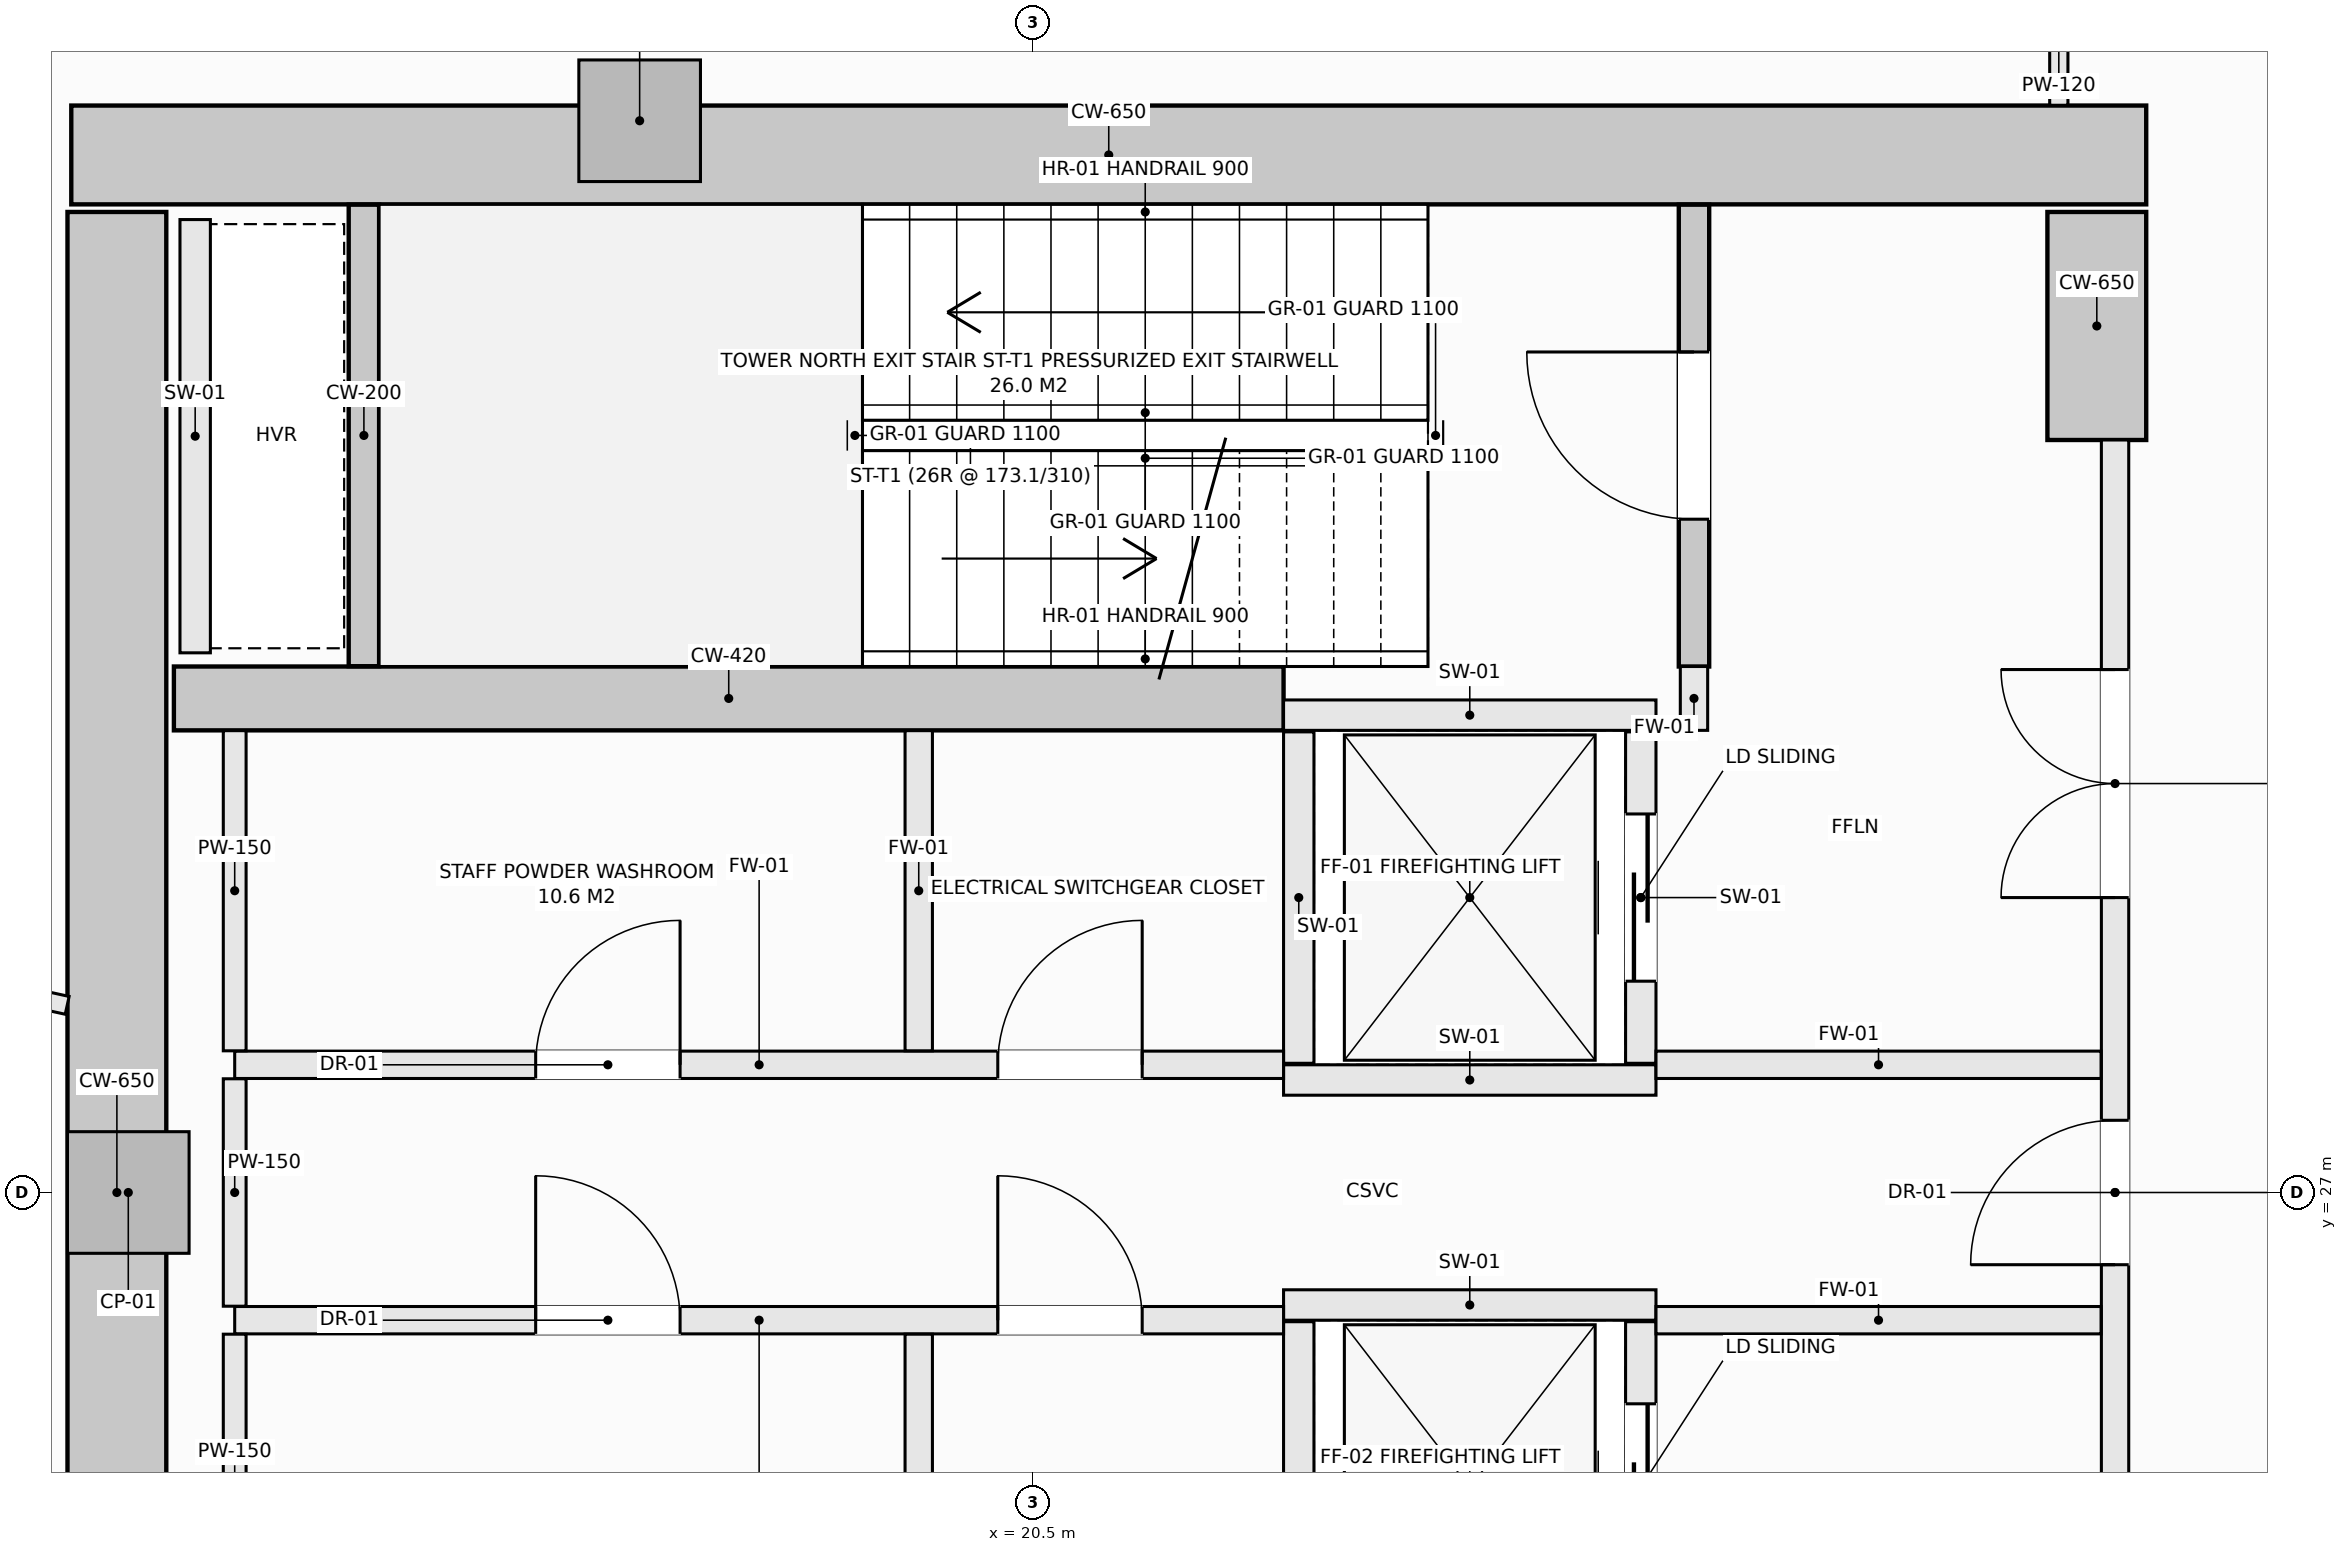
"""IFC4 building model, lengths in metres.
Left out: names, types, materials, properties, quantities, classifications, styles, units other than length and angle.
Written with IfcOpenShell. Run it as: python <this file> out.ifc"""

import sys

from ifc_helpers import new_model, si_unit, direction, frame, frame_2d, origin, origin_2d, place, context, subcontext, project, spatial, rectangle, extrude, element, fill, save


model = new_model("IFC4")
c1 = context("Model", 3, precision=1e-05, world=origin(), true_north=direction((0.0, 1.0)))
c2 = subcontext(c1, "Body", "Model", "MODEL_VIEW")
j1 = project(units=[si_unit("LENGTHUNIT", "METRE"), si_unit("PLANEANGLEUNIT", "RADIAN")], contexts=[c1])
p1 = place(None, origin())
s1 = spatial("IfcSite", under=j1, at=p1, CompositionType="ELEMENT")
p2 = place(p1, origin())
s2 = spatial("IfcBuilding", under=s1, at=p2, CompositionType="ELEMENT")
p3 = place(p2, frame((0.0, 0.0, 100.8)))
s3 = spatial("IfcBuildingStorey", under=s2, at=p3, CompositionType="ELEMENT", Elevation=100.8)
p4 = place(p3, frame((14.175, 33.825, -0.28), z_axis=(0.0, 0.0, 1.0), x_axis=(1.0, 0.0, 0.0)))
e1 = element("IfcWall", 1, at=p4, inside=s3, PredefinedType="SHEAR", context=c2, shape_type="SweptSolid", body=[
    extrude(rectangle(XDim=13.65, YDim=0.65, at=frame_2d((6.825, 0.0))), origin(), (0.0, 0.0, 1.0), 4.51),
])
p5 = place(p3, frame((14.475, 20.55, -0.28), z_axis=(0.0, 0.0, 1.0), x_axis=(0.0, 1.0, 0.0)))
e2 = element("IfcWall", 2, at=p5, inside=s3, PredefinedType="SHEAR", context=c2, shape_type="SweptSolid", body=[
    extrude(rectangle(XDim=12.9, YDim=0.65, at=frame_2d((6.45, 0.0))), origin(), (0.0, 0.0, 1.0), 4.51),
])
p6 = place(p3, frame((27.5, 31.95, -0.28), z_axis=(0.0, 0.0, 1.0), x_axis=(0.0, 1.0, 0.0)))
e3 = element("IfcWall", 3, at=p6, inside=s3, PredefinedType="SHEAR", context=c2, shape_type="SweptSolid", body=[
    extrude(rectangle(XDim=1.5, YDim=0.65, at=frame_2d((0.75, 0.0))), origin(), (0.0, 0.0, 1.0), 4.51),
])
p7 = place(p3, frame((14.85, 30.25, -0.28), z_axis=(0.0, 0.0, 1.0), x_axis=(1.0, 0.0, 0.0)))
e4 = element("IfcWall", 4, at=p7, inside=s3, PredefinedType="SHEAR", context=c2, shape_type="SweptSolid", body=[
    extrude(rectangle(XDim=7.3, YDim=0.42, at=frame_2d((3.65, 0.0))), origin(), (0.0, 0.0, 1.0), 4.51),
])
for number, where, z_axis, x_axis in (
    (5, (17.914, 34.05, -0.28), (0.0, 0.0, 1.0), (1.0, 0.0, 0.0)),
    (6, (14.55, 27.0, -0.28), (0.0, 0.0, 1.0), (1.0, 0.0, 0.0)),
):
    element("IfcColumn", number, at=place(p3, frame(where, z_axis=z_axis, x_axis=x_axis)), inside=s3, PredefinedType="PILASTER", context=c2, shape_type="SweptSolid", body=[
        extrude(rectangle(XDim=0.8, YDim=0.8, at=origin_2d()), origin(), (0.0, 0.0, 1.0), 4.51),
    ])
p8 = place(p3, frame((24.85, 30.46, -0.28), z_axis=(0.0, 0.0, 1.0), x_axis=(0.0, 1.0, 0.0)))
e7 = element("IfcWall", 7, at=p8, inside=s3, PredefinedType="SHEAR", context=c2, shape_type="SweptSolid", body=[
    extrude(rectangle(XDim=3.038, YDim=0.2, at=frame_2d((1.519, 0.0))), origin(), (0.0, 0.0, 1.0), 4.51),
])
p9 = place(p8, frame((0.969, 0.0, 0.28)))
e8 = element("IfcOpeningElement", 8, at=p9, cuts=e7, PredefinedType="OPENING", context=c2, shape_type="SweptSolid", body=[
    extrude(rectangle(XDim=1.1, YDim=2.15, at=frame_2d((0.55, 1.075))), frame((0.0, 0.11, 0.0), z_axis=(0.0, -1.0, 0.0), x_axis=(1.0, 0.0, 0.0)), (0.0, 0.0, 1.0), 0.22),
])
p10 = place(p3, frame((16.1, 30.462, -0.28), z_axis=(0.0, 0.0, 1.0), x_axis=(0.0, 1.0, 0.0)))
e9 = element("IfcWall", 9, at=p10, inside=s3, PredefinedType="SHEAR", context=c2, shape_type="SweptSolid", body=[
    extrude(rectangle(XDim=3.036, YDim=0.2, at=frame_2d((1.518, 0.0))), origin(), (0.0, 0.0, 1.0), 4.51),
])
for number, where, z_axis, x_axis in (
    (10, (22.15, 30.14, 0.0), (0.0, 0.0, 1.0), (1.0, 0.0, 0.0)),
    (11, (22.15, 27.74, 0.0), (0.0, 0.0, 1.0), (1.0, 0.0, 0.0)),
):
    element("IfcWall", number, at=place(p3, frame(where, z_axis=z_axis, x_axis=x_axis)), inside=s3, PredefinedType="SOLIDWALL", context=c2, shape_type="SweptSolid", body=[
        extrude(rectangle(XDim=2.45, YDim=0.2, at=frame_2d((1.225, 0.0))), origin(), (0.0, 0.0, 1.0), 4.23),
    ])
p11 = place(p3, frame((22.25, 27.85, 0.0), z_axis=(0.0, 0.0, 1.0), x_axis=(0.0, 1.0, 0.0)))
e12 = element("IfcWall", 12, at=p11, inside=s3, PredefinedType="SOLIDWALL", context=c2, shape_type="SweptSolid", body=[
    extrude(rectangle(XDim=2.18, YDim=0.2, at=frame_2d((1.09, 0.0))), origin(), (0.0, 0.0, 1.0), 4.23),
])
p12 = place(p3, frame((24.5, 27.85, 0.0), z_axis=(0.0, 0.0, 1.0), x_axis=(0.0, 1.0, 0.0)))
e13 = element("IfcWall", 13, at=p12, inside=s3, PredefinedType="SOLIDWALL", context=c2, shape_type="SweptSolid", body=[
    extrude(rectangle(XDim=2.18, YDim=0.2, at=frame_2d((1.09, 0.0))), origin(), (0.0, 0.0, 1.0), 4.23),
])
p13 = place(p12, frame((0.54, 0.0, 0.0)))
e14 = element("IfcOpeningElement", 14, at=p13, cuts=e13, PredefinedType="OPENING", context=c2, shape_type="SweptSolid", body=[
    extrude(rectangle(XDim=1.1, YDim=2.2, at=frame_2d((0.55, 1.1))), frame((0.0, 0.11, 0.0), z_axis=(0.0, -1.0, 0.0), x_axis=(1.0, 0.0, 0.0)), (0.0, 0.0, 1.0), 0.22),
])
p14 = place(p3, frame((22.15, 26.26, 0.0), z_axis=(0.0, 0.0, 1.0), x_axis=(1.0, 0.0, 0.0)))
e15 = element("IfcWall", 15, at=p14, inside=s3, PredefinedType="SOLIDWALL", context=c2, shape_type="SweptSolid", body=[
    extrude(rectangle(XDim=2.45, YDim=0.2, at=frame_2d((1.225, 0.0))), origin(), (0.0, 0.0, 1.0), 4.23),
])
p15 = place(p3, frame((22.25, 23.97, 0.0), z_axis=(0.0, 0.0, 1.0), x_axis=(0.0, 1.0, 0.0)))
e16 = element("IfcWall", 16, at=p15, inside=s3, PredefinedType="SOLIDWALL", context=c2, shape_type="SweptSolid", body=[
    extrude(rectangle(XDim=2.18, YDim=0.2, at=frame_2d((1.09, 0.0))), origin(), (0.0, 0.0, 1.0), 4.23),
])
p16 = place(p3, frame((24.5, 23.97, 0.0), z_axis=(0.0, 0.0, 1.0), x_axis=(0.0, 1.0, 0.0)))
e17 = element("IfcWall", 17, at=p16, inside=s3, PredefinedType="SOLIDWALL", context=c2, shape_type="SweptSolid", body=[
    extrude(rectangle(XDim=2.18, YDim=0.2, at=frame_2d((1.09, 0.0))), origin(), (0.0, 0.0, 1.0), 4.23),
])
p17 = place(p16, frame((0.54, 0.0, 0.0)))
e18 = element("IfcOpeningElement", 18, at=p17, cuts=e17, PredefinedType="OPENING", context=c2, shape_type="SweptSolid", body=[
    extrude(rectangle(XDim=1.1, YDim=2.2, at=frame_2d((0.55, 1.1))), frame((0.0, 0.11, 0.0), z_axis=(0.0, -1.0, 0.0), x_axis=(1.0, 0.0, 0.0)), (0.0, 0.0, 1.0), 0.22),
])
p18 = place(p3, frame((14.99, 30.55, 0.0), z_axis=(0.0, 0.0, 1.0), x_axis=(0.0, 1.0, 0.0)))
e19 = element("IfcWall", 19, at=p18, inside=s3, PredefinedType="SOLIDWALL", context=c2, shape_type="SweptSolid", body=[
    extrude(rectangle(XDim=2.85, YDim=0.2, at=frame_2d((1.425, 0.0))), origin(), (0.0, 0.0, 1.0), 4.23),
])
p19 = place(p3, frame((24.85, 30.04, 0.0), z_axis=(0.0, 0.0, 1.0), x_axis=(0.0, 1.0, 0.0)))
e20 = element("IfcWall", 20, at=p19, inside=s3, PredefinedType="SOLIDWALL", context=c2, shape_type="SweptSolid", body=[
    extrude(rectangle(XDim=0.42, YDim=0.18, at=frame_2d((0.21, 0.0))), origin(), (0.0, 0.0, 1.0), 4.23),
])
p20 = place(p3, frame((27.62, 22.05, 0.0), z_axis=(0.0, 0.0, 1.0), x_axis=(0.0, 1.0, 0.0)))
e21 = element("IfcWall", 21, at=p20, inside=s3, PredefinedType="SOLIDWALL", context=c2, shape_type="SweptSolid", body=[
    extrude(rectangle(XDim=9.9, YDim=0.18, at=frame_2d((4.95, 0.0))), origin(), (0.0, 0.0, 1.0), 3.322),
])
p21 = place(p20, frame((4.475, 0.0, 0.0)))
e22 = element("IfcOpeningElement", 22, at=p21, cuts=e21, PredefinedType="OPENING", context=c2, shape_type="SweptSolid", body=[
    extrude(rectangle(XDim=0.95, YDim=2.1, at=frame_2d((0.475, 1.05))), frame((0.0, 0.1, 0.0), z_axis=(0.0, -1.0, 0.0), x_axis=(1.0, 0.0, 0.0)), (0.0, 0.0, 1.0), 0.2),
])
p22 = place(p20, frame((6.89, 0.0, 0.0)))
e23 = element("IfcOpeningElement", 23, at=p22, cuts=e21, PredefinedType="OPENING", context=c2, shape_type="SweptSolid", body=[
    extrude(rectangle(XDim=1.5, YDim=2.2, at=frame_2d((0.75, 1.1))), frame((0.0, 0.1, 0.0), z_axis=(0.0, -1.0, 0.0), x_axis=(1.0, 0.0, 0.0)), (0.0, 0.0, 1.0), 0.2),
])
p23 = place(p20, frame((1.51, 0.0, 0.0)))
e24 = element("IfcOpeningElement", 24, at=p23, cuts=e21, PredefinedType="OPENING", context=c2, shape_type="SweptSolid", body=[
    extrude(rectangle(XDim=1.5, YDim=2.2, at=frame_2d((0.75, 1.1))), frame((0.0, 0.1, 0.0), z_axis=(0.0, -1.0, 0.0), x_axis=(1.0, 0.0, 0.0)), (0.0, 0.0, 1.0), 0.2),
])
p24 = place(p3, frame((15.25, 27.84, 0.0), z_axis=(0.0, 0.0, 1.0), x_axis=(1.0, 0.0, 0.0)))
e25 = element("IfcWall", 25, at=p24, inside=s3, PredefinedType="SOLIDWALL", context=c2, shape_type="SweptSolid", body=[
    extrude(rectangle(XDim=6.9, YDim=0.18, at=frame_2d((3.45, 0.0))), origin(), (0.0, 0.0, 1.0), 4.23),
])
p25 = place(p24, frame((5.02, 0.0, 0.0)))
e26 = element("IfcOpeningElement", 26, at=p25, cuts=e25, PredefinedType="OPENING", context=c2, shape_type="SweptSolid", body=[
    extrude(rectangle(XDim=0.95, YDim=2.1, at=frame_2d((0.475, 1.05))), frame((0.0, 0.1, 0.0), z_axis=(0.0, -1.0, 0.0), x_axis=(1.0, 0.0, 0.0)), (0.0, 0.0, 1.0), 0.2),
])
p26 = place(p24, frame((1.98, 0.0, 0.0)))
e27 = element("IfcOpeningElement", 27, at=p26, cuts=e25, PredefinedType="OPENING", context=c2, shape_type="SweptSolid", body=[
    extrude(rectangle(XDim=0.95, YDim=2.1, at=frame_2d((0.475, 1.05))), frame((0.0, 0.1, 0.0), z_axis=(0.0, -1.0, 0.0), x_axis=(1.0, 0.0, 0.0)), (0.0, 0.0, 1.0), 0.2),
])
p27 = place(p3, frame((24.6, 27.84, 0.0), z_axis=(0.0, 0.0, 1.0), x_axis=(1.0, 0.0, 0.0)))
e28 = element("IfcWall", 28, at=p27, inside=s3, PredefinedType="SOLIDWALL", context=c2, shape_type="SweptSolid", body=[
    extrude(rectangle(XDim=2.928, YDim=0.18, at=frame_2d((1.464, 0.0))), origin(), (0.0, 0.0, 1.0), 4.23),
])
p28 = place(p3, frame((15.25, 26.16, 0.0), z_axis=(0.0, 0.0, 1.0), x_axis=(1.0, 0.0, 0.0)))
e29 = element("IfcWall", 29, at=p28, inside=s3, PredefinedType="SOLIDWALL", context=c2, shape_type="SweptSolid", body=[
    extrude(rectangle(XDim=6.9, YDim=0.18, at=frame_2d((3.45, 0.0))), origin(), (0.0, 0.0, 1.0), 4.23),
])
p29 = place(p28, frame((5.02, 0.0, 0.0)))
e30 = element("IfcOpeningElement", 30, at=p29, cuts=e29, PredefinedType="OPENING", context=c2, shape_type="SweptSolid", body=[
    extrude(rectangle(XDim=0.95, YDim=2.1, at=frame_2d((0.475, 1.05))), frame((0.0, 0.1, 0.0), z_axis=(0.0, -1.0, 0.0), x_axis=(1.0, 0.0, 0.0)), (0.0, 0.0, 1.0), 0.2),
])
p30 = place(p28, frame((1.98, 0.0, 0.0)))
e31 = element("IfcOpeningElement", 31, at=p30, cuts=e29, PredefinedType="OPENING", context=c2, shape_type="SweptSolid", body=[
    extrude(rectangle(XDim=0.95, YDim=2.1, at=frame_2d((0.475, 1.05))), frame((0.0, 0.1, 0.0), z_axis=(0.0, -1.0, 0.0), x_axis=(1.0, 0.0, 0.0)), (0.0, 0.0, 1.0), 0.2),
])
p31 = place(p3, frame((24.6, 26.16, 0.0), z_axis=(0.0, 0.0, 1.0), x_axis=(1.0, 0.0, 0.0)))
e32 = element("IfcWall", 32, at=p31, inside=s3, PredefinedType="SOLIDWALL", context=c2, shape_type="SweptSolid", body=[
    extrude(rectangle(XDim=2.928, YDim=0.18, at=frame_2d((1.464, 0.0))), origin(), (0.0, 0.0, 1.0), 4.23),
])
p32 = place(p3, frame((15.25, 23.962, 0.0), z_axis=(0.0, 0.0, 1.0), x_axis=(0.0, 1.0, 0.0)))
e33 = element("IfcWall", 33, at=p32, inside=s3, PredefinedType="PARTITIONING", context=c2, shape_type="SweptSolid", body=[
    extrude(rectangle(XDim=2.106, YDim=0.15, at=frame_2d((1.053, 0.0))), origin(), (0.0, 0.0, 1.0), 4.23),
])
p33 = place(p3, frame((15.25, 26.252, 0.0), z_axis=(0.0, 0.0, 1.0), x_axis=(0.0, 1.0, 0.0)))
e34 = element("IfcWall", 34, at=p33, inside=s3, PredefinedType="PARTITIONING", context=c2, shape_type="SweptSolid", body=[
    extrude(rectangle(XDim=1.496, YDim=0.15, at=frame_2d((0.748, 0.0))), origin(), (0.0, 0.0, 1.0), 4.23),
])
p34 = place(p3, frame((15.25, 27.932, 0.0), z_axis=(0.0, 0.0, 1.0), x_axis=(0.0, 1.0, 0.0)))
e35 = element("IfcWall", 35, at=p34, inside=s3, PredefinedType="PARTITIONING", context=c2, shape_type="SweptSolid", body=[
    extrude(rectangle(XDim=2.106, YDim=0.15, at=frame_2d((1.053, 0.0))), origin(), (0.0, 0.0, 1.0), 4.23),
])
for number, where, z_axis, x_axis in (
    (36, (19.75, 23.962, 0.0), (0.0, 0.0, 1.0), (0.0, 1.0, 0.0)),
    (37, (19.75, 27.932, 0.0), (0.0, 0.0, 1.0), (0.0, 1.0, 0.0)),
):
    element("IfcWall", number, at=place(p3, frame(where, z_axis=z_axis, x_axis=x_axis)), inside=s3, PredefinedType="SOLIDWALL", context=c2, shape_type="SweptSolid", body=[
        extrude(rectangle(XDim=2.106, YDim=0.18, at=frame_2d((1.053, 0.0))), origin(), (0.0, 0.0, 1.0), 4.23),
    ])
p35 = place(p3, frame((27.25, 34.152, 0.0), z_axis=(0.0, 0.0, 1.0), x_axis=(0.0, 1.0, 0.0)))
e38 = element("IfcWall", 38, at=p35, inside=s3, PredefinedType="PARTITIONING", context=c2, shape_type="SweptSolid", body=[
    extrude(rectangle(XDim=0.806, YDim=0.12, at=frame_2d((0.403, 0.0))), origin(), (0.0, 0.0, 1.0), 4.23),
])
p36 = place(p3, frame((6.567, 29.887, 0.0), z_axis=(0.0, 0.0, 1.0), x_axis=(0.976956632184, -0.213437903927, 0.0)))
e39 = element("IfcWall", 39, at=p36, inside=s3, PredefinedType="PARTITIONING", context=c2, shape_type="SweptSolid", body=[
    extrude(rectangle(XDim=7.76, YDim=0.12, at=frame_2d((3.88, 0.0))), origin(), (0.0, 0.0, 1.0), 4.23),
])
p37 = place(p9, origin())
e40 = element("IfcDoor", 40, at=p37, inside=s3, OperationType="SINGLE_SWING_RIGHT", PredefinedType="DOOR", context=c2, shape_type="SweptSolid", body=[
    extrude(rectangle(XDim=1.1, YDim=2.15, at=frame_2d((0.55, 1.075))), frame((0.0, 0.025, 0.0), z_axis=(0.0, -1.0, 0.0), x_axis=(1.0, 0.0, 0.0)), (0.0, 0.0, 1.0), 0.05),
])
fill(e8, e40)
p38 = place(p13, origin())
e41 = element("IfcDoor", 41, at=p38, inside=s3, OperationType="SLIDING_TO_LEFT", PredefinedType="DOOR", context=c2, shape_type="SweptSolid", body=[
    extrude(rectangle(XDim=1.1, YDim=2.2, at=frame_2d((0.55, 1.1))), frame((0.0, 0.025, 0.0), z_axis=(0.0, -1.0, 0.0), x_axis=(1.0, 0.0, 0.0)), (0.0, 0.0, 1.0), 0.05),
])
fill(e14, e41)
p39 = place(p17, origin())
e42 = element("IfcDoor", 42, at=p39, inside=s3, OperationType="SLIDING_TO_LEFT", PredefinedType="DOOR", context=c2, shape_type="SweptSolid", body=[
    extrude(rectangle(XDim=1.1, YDim=2.2, at=frame_2d((0.55, 1.1))), frame((0.0, 0.025, 0.0), z_axis=(0.0, -1.0, 0.0), x_axis=(1.0, 0.0, 0.0)), (0.0, 0.0, 1.0), 0.05),
])
fill(e18, e42)
p40 = place(p21, origin())
e43 = element("IfcDoor", 43, at=p40, inside=s3, OperationType="SINGLE_SWING_LEFT", PredefinedType="DOOR", context=c2, shape_type="SweptSolid", body=[
    extrude(rectangle(XDim=0.95, YDim=2.1, at=frame_2d((0.475, 1.05))), frame((0.0, 0.025, 0.0), z_axis=(0.0, -1.0, 0.0), x_axis=(1.0, 0.0, 0.0)), (0.0, 0.0, 1.0), 0.05),
])
fill(e22, e43)
p41 = place(p22, origin())
e44 = element("IfcDoor", 44, at=p41, inside=s3, OperationType="DOUBLE_DOOR_SINGLE_SWING", PredefinedType="DOOR", context=c2, shape_type="SweptSolid", body=[
    extrude(rectangle(XDim=1.5, YDim=2.2, at=frame_2d((0.75, 1.1))), frame((0.0, 0.025, 0.0), z_axis=(0.0, -1.0, 0.0), x_axis=(1.0, 0.0, 0.0)), (0.0, 0.0, 1.0), 0.05),
])
fill(e23, e44)
p42 = place(p25, origin())
e45 = element("IfcDoor", 45, at=p42, inside=s3, OperationType="SINGLE_SWING_RIGHT", PredefinedType="DOOR", context=c2, shape_type="SweptSolid", body=[
    extrude(rectangle(XDim=0.95, YDim=2.1, at=frame_2d((0.475, 1.05))), frame((0.0, 0.025, 0.0), z_axis=(0.0, -1.0, 0.0), x_axis=(1.0, 0.0, 0.0)), (0.0, 0.0, 1.0), 0.05),
])
fill(e26, e45)
p43 = place(p29, origin())
e46 = element("IfcDoor", 46, at=p43, inside=s3, OperationType="SINGLE_SWING_LEFT", PredefinedType="DOOR", context=c2, shape_type="SweptSolid", body=[
    extrude(rectangle(XDim=0.95, YDim=2.1, at=frame_2d((0.475, 1.05))), frame((0.0, 0.025, 0.0), z_axis=(0.0, -1.0, 0.0), x_axis=(1.0, 0.0, 0.0)), (0.0, 0.0, 1.0), 0.05),
])
fill(e30, e46)
p44 = place(p26, origin())
e47 = element("IfcDoor", 47, at=p44, inside=s3, OperationType="SINGLE_SWING_RIGHT", PredefinedType="DOOR", context=c2, shape_type="SweptSolid", body=[
    extrude(rectangle(XDim=0.95, YDim=2.1, at=frame_2d((0.475, 1.05))), frame((0.0, 0.025, 0.0), z_axis=(0.0, -1.0, 0.0), x_axis=(1.0, 0.0, 0.0)), (0.0, 0.0, 1.0), 0.05),
])
fill(e27, e47)
p45 = place(p30, origin())
e48 = element("IfcDoor", 48, at=p45, inside=s3, OperationType="SINGLE_SWING_LEFT", PredefinedType="DOOR", context=c2, shape_type="SweptSolid", body=[
    extrude(rectangle(XDim=0.95, YDim=2.1, at=frame_2d((0.475, 1.05))), frame((0.0, 0.025, 0.0), z_axis=(0.0, -1.0, 0.0), x_axis=(1.0, 0.0, 0.0)), (0.0, 0.0, 1.0), 0.05),
])
fill(e31, e48)
save(model, sys.argv[1])
